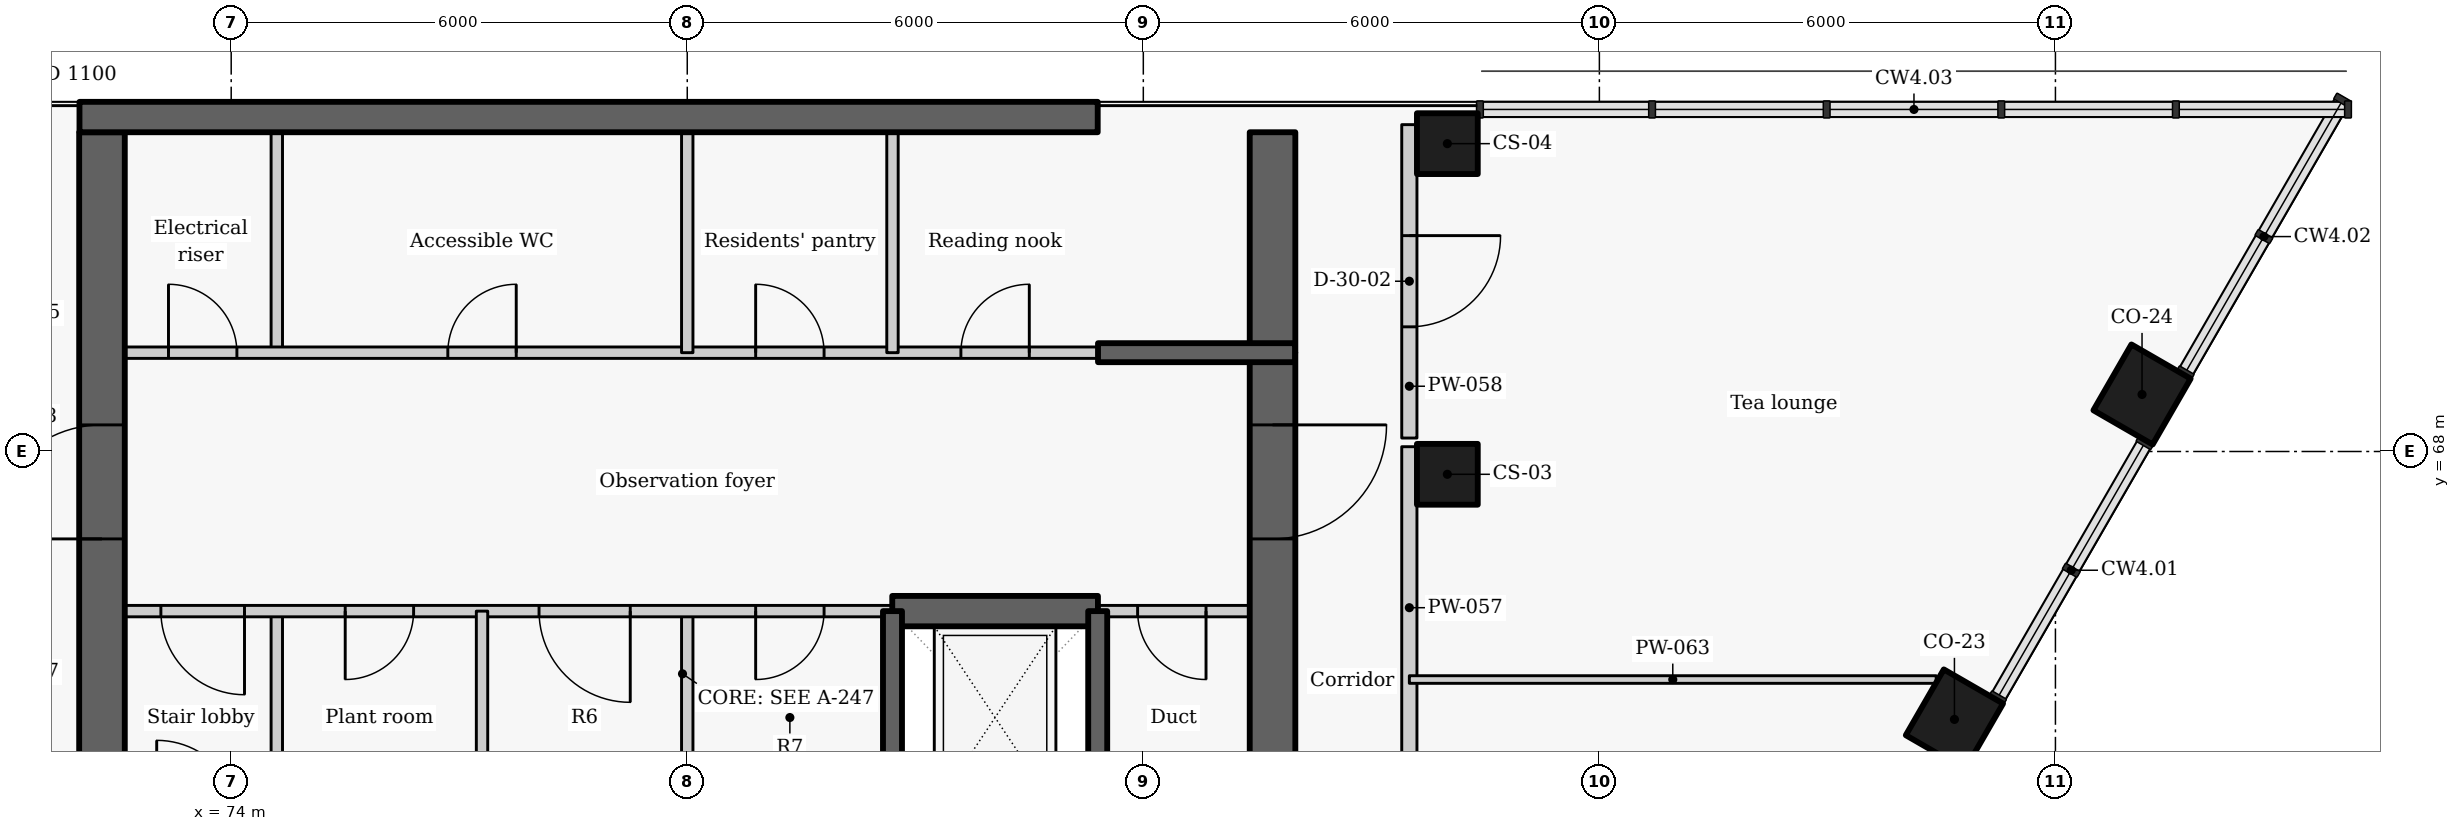
"""IFC4 building model, lengths in metres.
Left out: names, types, materials, properties, quantities, classifications, styles, units other than length and angle.
Written with IfcOpenShell. Run it as: python <this file> out.ifc"""

import sys

from ifc_helpers import new_model, si_unit, direction, frame, frame_2d, origin, origin_2d, place, context, subcontext, project, spatial, rectangle, extrude, element, fill, save


model = new_model("IFC4")
c1 = context("Model", 3, precision=1e-05, world=origin(), true_north=direction((0.0, 1.0)))
c2 = subcontext(c1, "Body", "Model", "MODEL_VIEW")
j1 = project(units=[si_unit("LENGTHUNIT", "METRE"), si_unit("PLANEANGLEUNIT", "RADIAN")], contexts=[c1])
p1 = place(None, origin())
s1 = spatial("IfcSite", under=j1, at=p1, CompositionType="ELEMENT")
p2 = place(p1, origin())
s2 = spatial("IfcBuilding", under=s1, at=p2, CompositionType="ELEMENT")
p3 = place(p2, frame((0.0, 0.0, 279.6)))
s3 = spatial("IfcBuildingStorey", under=s2, at=p3, CompositionType="ELEMENT", Elevation=279.6)
for number, where, z_axis, x_axis in (
    (1, (96.671, 64.475, 0.0), (0.0, 0.0, 1.0), (0.5, 0.866, 0.0)),
    (2, (99.139, 68.75, 0.0), (0.0, 0.0, 1.0), (0.5, 0.866, 0.0)),
):
    element("IfcColumn", number, at=place(p3, frame(where, z_axis=z_axis, x_axis=x_axis)), inside=s3, PredefinedType="COLUMN", context=c2, shape_type="SweptSolid", body=[
        extrude(rectangle(XDim=1.0, YDim=0.9, at=origin_2d()), origin(), (0.0, 0.0, 1.0), 3.6),
    ])
for number, where, z_axis, x_axis in (
    (3, (90.0, 67.7, 0.0), (0.0, 0.0, 1.0), (0.0, 1.0, 0.0)),
    (4, (90.0, 72.05, 0.0), (0.0, 0.0, 1.0), (0.0, 1.0, 0.0)),
):
    element("IfcColumn", number, at=place(p3, frame(where, z_axis=z_axis, x_axis=x_axis)), inside=s3, PredefinedType="COLUMN", context=c2, shape_type="SweptSolid", body=[
        extrude(rectangle(XDim=0.8, YDim=0.8, at=origin_2d()), origin(), (0.0, 0.0, 1.0), 3.6),
    ])
p4 = place(p3, frame((74.6, 63.1, 0.0), z_axis=(0.0, 0.0, 1.0), x_axis=(0.0, 1.0, 0.0)))
e5 = element("IfcWall", 5, at=p4, inside=s3, PredefinedType="PARTITIONING", context=c2, shape_type="SweptSolid", body=[
    extrude(rectangle(XDim=2.8, YDim=0.15, at=frame_2d((1.4, 0.0))), origin(), (0.0, 0.0, 1.0), 3.325),
])
p5 = place(p3, frame((74.6, 69.3, 0.0), z_axis=(0.0, 0.0, 1.0), x_axis=(0.0, 1.0, 0.0)))
e6 = element("IfcWall", 6, at=p5, inside=s3, PredefinedType="PARTITIONING", context=c2, shape_type="SweptSolid", body=[
    extrude(rectangle(XDim=2.9, YDim=0.15, at=frame_2d((1.45, 0.0))), origin(), (0.0, 0.0, 1.0), 3.325),
])
p6 = place(p3, frame((72.0, 69.3, 0.0), z_axis=(0.0, 0.0, 1.0), x_axis=(1.0, 0.0, 0.0)))
e7 = element("IfcWall", 7, at=p6, inside=s3, PredefinedType="PARTITIONING", context=c2, shape_type="SweptSolid", body=[
    extrude(rectangle(XDim=13.4, YDim=0.15, at=frame_2d((6.7, 0.0))), origin(), (0.0, 0.0, 1.0), 3.325),
])
p7 = place(p6, frame((1.175, 0.0, 0.0)))
e8 = element("IfcOpeningElement", 8, at=p7, cuts=e7, PredefinedType="OPENING", context=c2, shape_type="SweptSolid", body=[
    extrude(rectangle(XDim=0.9, YDim=2.1, at=frame_2d((0.45, 1.05))), frame((0.0, 0.085, 0.0), z_axis=(0.0, -1.0, 0.0), x_axis=(1.0, 0.0, 0.0)), (0.0, 0.0, 1.0), 0.17),
])
p8 = place(p6, frame((4.85, 0.0, 0.0)))
e9 = element("IfcOpeningElement", 9, at=p8, cuts=e7, PredefinedType="OPENING", context=c2, shape_type="SweptSolid", body=[
    extrude(rectangle(XDim=0.9, YDim=2.1, at=frame_2d((0.45, 1.05))), frame((0.0, 0.085, 0.0), z_axis=(0.0, -1.0, 0.0), x_axis=(1.0, 0.0, 0.0)), (0.0, 0.0, 1.0), 0.17),
])
p9 = place(p6, frame((8.9, 0.0, 0.0)))
e10 = element("IfcOpeningElement", 10, at=p9, cuts=e7, PredefinedType="OPENING", context=c2, shape_type="SweptSolid", body=[
    extrude(rectangle(XDim=0.9, YDim=2.1, at=frame_2d((0.45, 1.05))), frame((0.0, 0.085, 0.0), z_axis=(0.0, -1.0, 0.0), x_axis=(1.0, 0.0, 0.0)), (0.0, 0.0, 1.0), 0.17),
])
p10 = place(p6, frame((11.6, 0.0, 0.0)))
e11 = element("IfcOpeningElement", 11, at=p10, cuts=e7, PredefinedType="OPENING", context=c2, shape_type="SweptSolid", body=[
    extrude(rectangle(XDim=0.9, YDim=2.1, at=frame_2d((0.45, 1.05))), frame((0.0, 0.085, 0.0), z_axis=(0.0, -1.0, 0.0), x_axis=(1.0, 0.0, 0.0)), (0.0, 0.0, 1.0), 0.17),
])
p11 = place(p3, frame((72.3, 63.1, -0.275), z_axis=(0.0, 0.0, 1.0), x_axis=(0.0, 1.0, 0.0)))
e12 = element("IfcWall", 12, at=p11, inside=s3, PredefinedType="SHEAR", context=c2, shape_type="SweptSolid", body=[
    extrude(rectangle(XDim=9.1, YDim=0.6, at=frame_2d((4.55, 0.0))), origin(), (0.0, 0.0, 1.0), 3.6),
])
p12 = place(p11, frame((3.75, 0.0, 0.275)))
e13 = element("IfcOpeningElement", 13, at=p12, cuts=e12, PredefinedType="OPENING", context=c2, shape_type="SweptSolid", body=[
    extrude(rectangle(XDim=1.5, YDim=2.1, at=frame_2d((0.75, 1.05))), frame((0.0, 0.31, 0.0), z_axis=(0.0, -1.0, 0.0), x_axis=(1.0, 0.0, 0.0)), (0.0, 0.0, 1.0), 0.62),
])
p13 = place(p3, frame((80.0, 63.1, 0.0), z_axis=(0.0, 0.0, 1.0), x_axis=(0.0, 1.0, 0.0)))
e14 = element("IfcWall", 14, at=p13, inside=s3, PredefinedType="PARTITIONING", context=c2, shape_type="SweptSolid", body=[
    extrude(rectangle(XDim=2.8, YDim=0.15, at=frame_2d((1.4, 0.0))), origin(), (0.0, 0.0, 1.0), 3.325),
])
for number, where, z_axis, x_axis in (
    (15, (80.0, 69.3, 0.0), (0.0, 0.0, 1.0), (0.0, 1.0, 0.0)),
    (16, (82.7, 69.3, 0.0), (0.0, 0.0, 1.0), (0.0, 1.0, 0.0)),
):
    element("IfcWall", number, at=place(p3, frame(where, z_axis=z_axis, x_axis=x_axis)), inside=s3, PredefinedType="PARTITIONING", context=c2, shape_type="SweptSolid", body=[
        extrude(rectangle(XDim=2.9, YDim=0.15, at=frame_2d((1.45, 0.0))), origin(), (0.0, 0.0, 1.0), 3.325),
    ])
p14 = place(p3, frame((82.703, 65.9, 0.0), z_axis=(0.0, 0.0, 1.0), x_axis=(-1.0, 0.0, 0.0)))
e17 = element("IfcWall", 17, at=p14, inside=s3, PredefinedType="PARTITIONING", context=c2, shape_type="SweptSolid", body=[
    extrude(rectangle(XDim=10.703, YDim=0.15, at=frame_2d((5.352, 0.0))), origin(), (0.0, 0.0, 1.0), 3.325),
])
p15 = place(p14, frame((8.528, 0.0, 0.0)))
e18 = element("IfcOpeningElement", 18, at=p15, cuts=e17, PredefinedType="OPENING", context=c2, shape_type="SweptSolid", body=[
    extrude(rectangle(XDim=1.1, YDim=2.1, at=frame_2d((0.55, 1.05))), frame((0.0, 0.085, 0.0), z_axis=(0.0, -1.0, 0.0), x_axis=(1.0, 0.0, 0.0)), (0.0, 0.0, 1.0), 0.17),
])
p16 = place(p14, frame((6.303, 0.0, 0.0)))
e19 = element("IfcOpeningElement", 19, at=p16, cuts=e17, PredefinedType="OPENING", context=c2, shape_type="SweptSolid", body=[
    extrude(rectangle(XDim=0.9, YDim=2.1, at=frame_2d((0.45, 1.05))), frame((0.0, 0.085, 0.0), z_axis=(0.0, -1.0, 0.0), x_axis=(1.0, 0.0, 0.0)), (0.0, 0.0, 1.0), 0.17),
])
p17 = place(p14, frame((3.453, 0.0, 0.0)))
e20 = element("IfcOpeningElement", 20, at=p17, cuts=e17, PredefinedType="OPENING", context=c2, shape_type="SweptSolid", body=[
    extrude(rectangle(XDim=1.2, YDim=2.1, at=frame_2d((0.6, 1.05))), frame((0.0, 0.085, 0.0), z_axis=(0.0, -1.0, 0.0), x_axis=(1.0, 0.0, 0.0)), (0.0, 0.0, 1.0), 0.17),
])
p18 = place(p14, frame((0.903, 0.0, 0.0)))
e21 = element("IfcOpeningElement", 21, at=p18, cuts=e17, PredefinedType="OPENING", context=c2, shape_type="SweptSolid", body=[
    extrude(rectangle(XDim=0.9, YDim=2.1, at=frame_2d((0.45, 1.05))), frame((0.0, 0.085, 0.0), z_axis=(0.0, -1.0, 0.0), x_axis=(1.0, 0.0, 0.0)), (0.0, 0.0, 1.0), 0.17),
])
p19 = place(p3, frame((88.0, 65.9, 0.0), z_axis=(0.0, 0.0, 1.0), x_axis=(-1.0, 0.0, 0.0)))
e22 = element("IfcWall", 22, at=p19, inside=s3, PredefinedType="PARTITIONING", context=c2, shape_type="SweptSolid", body=[
    extrude(rectangle(XDim=2.603, YDim=0.15, at=frame_2d((1.302, 0.0))), origin(), (0.0, 0.0, 1.0), 3.325),
])
p20 = place(p19, frame((1.175, 0.0, 0.0)))
e23 = element("IfcOpeningElement", 23, at=p20, cuts=e22, PredefinedType="OPENING", context=c2, shape_type="SweptSolid", body=[
    extrude(rectangle(XDim=0.9, YDim=2.1, at=frame_2d((0.45, 1.05))), frame((0.0, 0.085, 0.0), z_axis=(0.0, -1.0, 0.0), x_axis=(1.0, 0.0, 0.0)), (0.0, 0.0, 1.0), 0.17),
])
p21 = place(p3, frame((82.697, 65.9, -0.275), z_axis=(0.0, 0.0, 1.0), x_axis=(1.0, 0.0, 0.0)))
e24 = element("IfcWall", 24, at=p21, inside=s3, PredefinedType="SHEAR", context=c2, shape_type="SweptSolid", body=[
    extrude(rectangle(XDim=2.706, YDim=0.4, at=frame_2d((1.353, 0.0))), origin(), (0.0, 0.0, 1.0), 3.6),
])
p22 = place(p3, frame((87.7, 69.3, -0.275), z_axis=(0.0, 0.0, 1.0), x_axis=(0.0, -1.0, 0.0)))
e25 = element("IfcWall", 25, at=p22, inside=s3, PredefinedType="SHEAR", context=c2, shape_type="SweptSolid", body=[
    extrude(rectangle(XDim=11.35, YDim=0.6, at=frame_2d((5.675, 0.0))), origin(), (0.0, 0.0, 1.0), 3.6),
])
p23 = place(p22, frame((0.95, 0.0, 0.275)))
e26 = element("IfcOpeningElement", 26, at=p23, cuts=e25, PredefinedType="OPENING", context=c2, shape_type="SweptSolid", body=[
    extrude(rectangle(XDim=1.5, YDim=2.1, at=frame_2d((0.75, 1.05))), frame((0.0, 0.31, 0.0), z_axis=(0.0, -1.0, 0.0), x_axis=(1.0, 0.0, 0.0)), (0.0, 0.0, 1.0), 0.62),
])
p24 = place(p22, frame((8.225, 0.0, 0.275)))
e27 = element("IfcOpeningElement", 27, at=p24, cuts=e25, PredefinedType="OPENING", context=c2, shape_type="SweptSolid", body=[
    extrude(rectangle(XDim=1.1, YDim=2.1, at=frame_2d((0.55, 1.05))), frame((0.0, 0.31, 0.0), z_axis=(0.0, -1.0, 0.0), x_axis=(1.0, 0.0, 0.0)), (0.0, 0.0, 1.0), 0.62),
])
p25 = place(p3, frame((77.3, 63.1, 0.0), z_axis=(0.0, 0.0, 1.0), x_axis=(0.0, 1.0, 0.0)))
e28 = element("IfcWall", 28, at=p25, inside=s3, PredefinedType="PARTITIONING", context=c2, shape_type="SweptSolid", body=[
    extrude(rectangle(XDim=2.8, YDim=0.15, at=frame_2d((1.4, 0.0))), origin(), (0.0, 0.0, 1.0), 3.325),
])
for number, where, z_axis, x_axis in (
    (29, (82.7, 63.1, -0.275), (0.0, 0.0, 1.0), (0.0, 1.0, 0.0)),
    (30, (85.4, 63.1, -0.275), (0.0, 0.0, 1.0), (0.0, 1.0, 0.0)),
):
    element("IfcWall", number, at=place(p3, frame(where, z_axis=z_axis, x_axis=x_axis)), inside=s3, PredefinedType="SHEAR", context=c2, shape_type="SweptSolid", body=[
        extrude(rectangle(XDim=2.8, YDim=0.25, at=frame_2d((1.4, 0.0))), origin(), (0.0, 0.0, 1.0), 3.6),
    ])
p26 = place(p3, frame((89.5, 63.827, 0.0), z_axis=(0.0, 0.0, 1.0), x_axis=(0.0, 1.0, 0.0)))
e31 = element("IfcWall", 31, at=p26, inside=s3, PredefinedType="PARTITIONING", context=c2, shape_type="SweptSolid", body=[
    extrude(rectangle(XDim=4.236, YDim=0.2, at=frame_2d((2.118, 0.0))), origin(), (0.0, 0.0, 1.0), 3.325),
])
p27 = place(p3, frame((89.5, 72.3, 0.0), z_axis=(0.0, 0.0, 1.0), x_axis=(0.0, -1.0, 0.0)))
e32 = element("IfcWall", 32, at=p27, inside=s3, PredefinedType="PARTITIONING", context=c2, shape_type="SweptSolid", body=[
    extrude(rectangle(XDim=4.123, YDim=0.2, at=frame_2d((2.062, 0.0))), origin(), (0.0, 0.0, 1.0), 3.325),
])
p28 = place(p27, frame((1.46, 0.0, 0.0)))
e33 = element("IfcOpeningElement", 33, at=p28, cuts=e32, PredefinedType="OPENING", context=c2, shape_type="SweptSolid", body=[
    extrude(rectangle(XDim=1.2, YDim=2.1, at=frame_2d((0.6, 1.05))), frame((0.0, 0.11, 0.0), z_axis=(0.0, -1.0, 0.0), x_axis=(1.0, 0.0, 0.0)), (0.0, 0.0, 1.0), 0.22),
])
p29 = place(p3, frame((89.5, 65.0, 0.0), z_axis=(0.0, 0.0, 1.0), x_axis=(1.0, 0.0, 0.0)))
e34 = element("IfcWall", 34, at=p29, inside=s3, PredefinedType="PARTITIONING", context=c2, shape_type="SweptSolid", body=[
    extrude(rectangle(XDim=6.931, YDim=0.1, at=frame_2d((3.466, 0.0))), origin(), (0.0, 0.0, 1.0), 2.805),
])
p30 = place(p3, frame((72.004, 72.4, -0.275), z_axis=(0.0, 0.0, 1.0), x_axis=(1.0, 0.0, 0.0)))
e35 = element("IfcWall", 35, at=p30, inside=s3, PredefinedType="SHEAR", context=c2, shape_type="SweptSolid", body=[
    extrude(rectangle(XDim=13.396, YDim=0.4, at=frame_2d((6.698, 0.0))), origin(), (0.0, 0.0, 1.0), 3.6),
])
p31 = place(p3, frame((87.7, 69.304, -0.275), z_axis=(0.0, 0.0, 1.0), x_axis=(0.0, 1.0, 0.0)))
e36 = element("IfcWall", 36, at=p31, inside=s3, PredefinedType="SHEAR", context=c2, shape_type="SweptSolid", body=[
    extrude(rectangle(XDim=2.896, YDim=0.6, at=frame_2d((1.448, 0.0))), origin(), (0.0, 0.0, 1.0), 3.6),
])
p32 = place(p3, frame((85.404, 69.3, -0.275), z_axis=(0.0, 0.0, 1.0), x_axis=(1.0, 0.0, 0.0)))
e37 = element("IfcWall", 37, at=p32, inside=s3, PredefinedType="SHEAR", context=c2, shape_type="SweptSolid", body=[
    extrude(rectangle(XDim=2.592, YDim=0.25, at=frame_2d((1.296, 0.0))), origin(), (0.0, 0.0, 1.0), 3.6),
])
p33 = place(p7, origin())
e38 = element("IfcDoor", 38, at=p33, inside=s3, OperationType="SINGLE_SWING_LEFT", PredefinedType="DOOR", context=c2, shape_type="SweptSolid", body=[
    extrude(rectangle(XDim=0.9, YDim=2.1, at=frame_2d((0.45, 1.05))), frame((0.0, 0.025, 0.0), z_axis=(0.0, -1.0, 0.0), x_axis=(1.0, 0.0, 0.0)), (0.0, 0.0, 1.0), 0.05),
])
fill(e8, e38)
p34 = place(p8, origin())
e39 = element("IfcDoor", 39, at=p34, inside=s3, OperationType="SINGLE_SWING_RIGHT", PredefinedType="DOOR", context=c2, shape_type="SweptSolid", body=[
    extrude(rectangle(XDim=0.9, YDim=2.1, at=frame_2d((0.45, 1.05))), frame((0.0, 0.025, 0.0), z_axis=(0.0, -1.0, 0.0), x_axis=(1.0, 0.0, 0.0)), (0.0, 0.0, 1.0), 0.05),
])
fill(e9, e39)
p35 = place(p9, origin())
e40 = element("IfcDoor", 40, at=p35, inside=s3, OperationType="SINGLE_SWING_LEFT", PredefinedType="DOOR", context=c2, shape_type="SweptSolid", body=[
    extrude(rectangle(XDim=0.9, YDim=2.1, at=frame_2d((0.45, 1.05))), frame((0.0, 0.025, 0.0), z_axis=(0.0, -1.0, 0.0), x_axis=(1.0, 0.0, 0.0)), (0.0, 0.0, 1.0), 0.05),
])
fill(e10, e40)
p36 = place(p10, origin())
e41 = element("IfcDoor", 41, at=p36, inside=s3, OperationType="SINGLE_SWING_RIGHT", PredefinedType="DOOR", context=c2, shape_type="SweptSolid", body=[
    extrude(rectangle(XDim=0.9, YDim=2.1, at=frame_2d((0.45, 1.05))), frame((0.0, 0.025, 0.0), z_axis=(0.0, -1.0, 0.0), x_axis=(1.0, 0.0, 0.0)), (0.0, 0.0, 1.0), 0.05),
])
fill(e11, e41)
p37 = place(p15, origin())
e42 = element("IfcDoor", 42, at=p37, inside=s3, OperationType="SINGLE_SWING_LEFT", PredefinedType="DOOR", context=c2, shape_type="SweptSolid", body=[
    extrude(rectangle(XDim=1.1, YDim=2.1, at=frame_2d((0.55, 1.05))), frame((0.0, 0.025, 0.0), z_axis=(0.0, -1.0, 0.0), x_axis=(1.0, 0.0, 0.0)), (0.0, 0.0, 1.0), 0.05),
])
fill(e18, e42)
p38 = place(p16, origin())
e43 = element("IfcDoor", 43, at=p38, inside=s3, OperationType="SINGLE_SWING_RIGHT", PredefinedType="DOOR", context=c2, shape_type="SweptSolid", body=[
    extrude(rectangle(XDim=0.9, YDim=2.1, at=frame_2d((0.45, 1.05))), frame((0.0, 0.025, 0.0), z_axis=(0.0, -1.0, 0.0), x_axis=(1.0, 0.0, 0.0)), (0.0, 0.0, 1.0), 0.05),
])
fill(e19, e43)
p39 = place(p17, origin())
e44 = element("IfcDoor", 44, at=p39, inside=s3, OperationType="DOUBLE_DOOR_SINGLE_SWING", PredefinedType="DOOR", context=c2, shape_type="SweptSolid", body=[
    extrude(rectangle(XDim=1.2, YDim=2.1, at=frame_2d((0.6, 1.05))), frame((0.0, 0.025, 0.0), z_axis=(0.0, -1.0, 0.0), x_axis=(1.0, 0.0, 0.0)), (0.0, 0.0, 1.0), 0.05),
])
fill(e20, e44)
p40 = place(p18, origin())
e45 = element("IfcDoor", 45, at=p40, inside=s3, OperationType="SINGLE_SWING_RIGHT", PredefinedType="DOOR", context=c2, shape_type="SweptSolid", body=[
    extrude(rectangle(XDim=0.9, YDim=2.1, at=frame_2d((0.45, 1.05))), frame((0.0, 0.025, 0.0), z_axis=(0.0, -1.0, 0.0), x_axis=(1.0, 0.0, 0.0)), (0.0, 0.0, 1.0), 0.05),
])
fill(e21, e45)
p41 = place(p20, origin())
e46 = element("IfcDoor", 46, at=p41, inside=s3, OperationType="SINGLE_SWING_LEFT", PredefinedType="DOOR", context=c2, shape_type="SweptSolid", body=[
    extrude(rectangle(XDim=0.9, YDim=2.1, at=frame_2d((0.45, 1.05))), frame((0.0, 0.025, 0.0), z_axis=(0.0, -1.0, 0.0), x_axis=(1.0, 0.0, 0.0)), (0.0, 0.0, 1.0), 0.05),
])
fill(e23, e46)
p42 = place(p28, origin())
e47 = element("IfcDoor", 47, at=p42, inside=s3, OperationType="SINGLE_SWING_LEFT", PredefinedType="DOOR", context=c2, shape_type="SweptSolid", body=[
    extrude(rectangle(XDim=1.2, YDim=2.1, at=frame_2d((0.6, 1.05))), frame((0.0, 0.025, 0.0), z_axis=(0.0, -1.0, 0.0), x_axis=(1.0, 0.0, 0.0)), (0.0, 0.0, 1.0), 0.05),
])
fill(e33, e47)
p43 = place(p23, origin())
e48 = element("IfcDoor", 48, at=p43, inside=s3, OperationType="DOUBLE_DOOR_SINGLE_SWING", PredefinedType="DOOR", context=c2, shape_type="SweptSolid", body=[
    extrude(rectangle(XDim=1.5, YDim=2.1, at=frame_2d((0.75, 1.05))), frame((0.0, 0.025, 0.0), z_axis=(0.0, -1.0, 0.0), x_axis=(1.0, 0.0, 0.0)), (0.0, 0.0, 1.0), 0.05),
])
fill(e26, e48)
p44 = place(p12, origin())
e49 = element("IfcDoor", 49, at=p44, inside=s3, OperationType="DOUBLE_DOOR_SINGLE_SWING", PredefinedType="DOOR", context=c2, shape_type="SweptSolid", body=[
    extrude(rectangle(XDim=1.5, YDim=2.1, at=frame_2d((0.75, 1.05))), frame((0.0, 0.025, 0.0), z_axis=(0.0, -1.0, 0.0), x_axis=(1.0, 0.0, 0.0)), (0.0, 0.0, 1.0), 0.05),
])
fill(e13, e49)
save(model, sys.argv[1])
